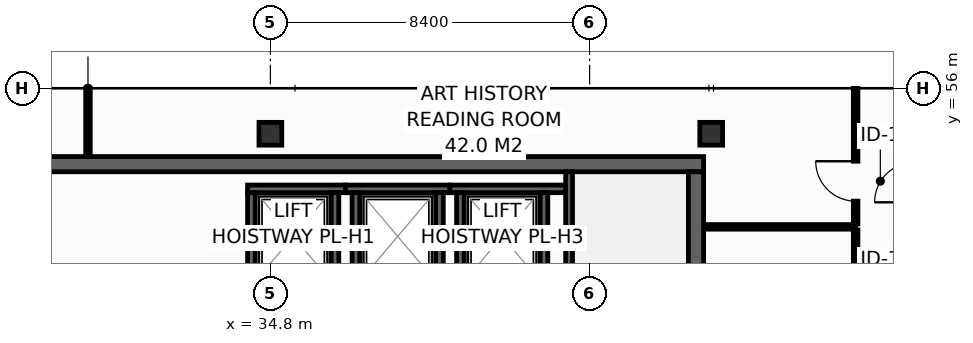
"""IFC4 building model, lengths in metres.
Left out: names, types, materials, properties, quantities, classifications, styles, units other than length and angle.
Written with IfcOpenShell. Run it as: python <this file> out.ifc"""

import sys

from ifc_helpers import new_model, si_unit, direction, frame, frame_2d, origin, origin_2d, place, context, subcontext, project, spatial, rectangle, hollow_rectangle, extrude, element, fill, save


model = new_model("IFC4")
c1 = context("Model", 3, precision=1e-05, world=origin(), true_north=direction((0.0, 1.0)))
c2 = subcontext(c1, "Body", "Model", "MODEL_VIEW")
j1 = project(units=[si_unit("LENGTHUNIT", "METRE"), si_unit("PLANEANGLEUNIT", "RADIAN")], contexts=[c1])
p1 = place(None, origin())
s1 = spatial("IfcSite", under=j1, at=p1, CompositionType="ELEMENT")
p2 = place(p1, origin())
s2 = spatial("IfcBuilding", under=s1, at=p2, CompositionType="ELEMENT")
p3 = place(p2, frame((0.0, 0.0, 280.0)))
s3 = spatial("IfcBuildingStorey", under=s2, at=p3, CompositionType="ELEMENT", Elevation=280.0)
p4 = place(p3, frame((13.7, 54.0, 0.0), z_axis=(0.0, 0.0, 1.0), x_axis=(1.0, 0.0, 0.0)))
e1 = element("IfcWall", 1, at=p4, inside=s3, PredefinedType="SHEAR", context=c2, shape_type="SweptSolid", body=[
    extrude(rectangle(XDim=32.5, YDim=0.4, at=frame_2d((16.25, 0.0))), origin(), (0.0, 0.0, 1.0), 3.55),
])
p5 = place(p3, frame((46.0, 43.4, 0.0), z_axis=(0.0, 0.0, 1.0), x_axis=(0.0, 1.0, 0.0)))
e2 = element("IfcWall", 2, at=p5, inside=s3, PredefinedType="SHEAR", context=c2, shape_type="SweptSolid", body=[
    extrude(rectangle(XDim=10.4, YDim=0.4, at=frame_2d((5.2, 0.0))), origin(), (0.0, 0.0, 1.0), 3.55),
])
for number, where, z_axis, x_axis in (
    (3, (34.8, 54.8, 0.0), (0.0, 0.0, 1.0), (1.0, 0.0, 0.0)),
    (4, (46.4, 54.8, 0.0), (0.0, 0.0, 1.0), (1.0, 0.0, 0.0)),
):
    element("IfcColumn", number, at=place(p3, frame(where, z_axis=z_axis, x_axis=x_axis)), inside=s3, PredefinedType="COLUMN", context=c2, shape_type="SweptSolid", body=[
        extrude(hollow_rectangle(XDim=0.6, YDim=0.6, WallThickness=0.028, at=origin_2d()), origin(), (0.0, 0.0, 1.0), 3.8),
    ])
p6 = place(p3, frame((34.2, 53.35, 0.0), z_axis=(0.0, 0.0, 1.0), x_axis=(1.0, 0.0, 0.0)))
e5 = element("IfcWall", 5, at=p6, inside=s3, PredefinedType="SHEAR", context=c2, shape_type="SweptSolid", body=[
    extrude(rectangle(XDim=2.575, YDim=0.2, at=frame_2d((1.288, 0.0))), origin(), (0.0, 0.0, 1.0), 3.55),
])
for number, where, z_axis, x_axis in (
    (6, (34.3, 50.95, 0.0), (0.0, 0.0, 1.0), (0.0, 1.0, 0.0)),
    (7, (36.5, 50.95, 0.0), (0.0, 0.0, 1.0), (0.0, 1.0, 0.0)),
):
    element("IfcWall", number, at=place(p3, frame(where, z_axis=z_axis, x_axis=x_axis)), inside=s3, PredefinedType="SHEAR", context=c2, shape_type="SweptSolid", body=[
        extrude(rectangle(XDim=2.3, YDim=0.2, at=frame_2d((1.15, 0.0))), origin(), (0.0, 0.0, 1.0), 3.55),
    ])
p7 = place(p3, frame((36.775, 53.35, 0.0), z_axis=(0.0, 0.0, 1.0), x_axis=(1.0, 0.0, 0.0)))
e8 = element("IfcWall", 8, at=p7, inside=s3, PredefinedType="SHEAR", context=c2, shape_type="SweptSolid", body=[
    extrude(rectangle(XDim=2.75, YDim=0.2, at=frame_2d((1.375, 0.0))), origin(), (0.0, 0.0, 1.0), 3.55),
])
for number, where, z_axis, x_axis in (
    (9, (37.05, 50.95, 0.0), (0.0, 0.0, 1.0), (0.0, 1.0, 0.0)),
    (10, (39.25, 50.95, 0.0), (0.0, 0.0, 1.0), (0.0, 1.0, 0.0)),
):
    element("IfcWall", number, at=place(p3, frame(where, z_axis=z_axis, x_axis=x_axis)), inside=s3, PredefinedType="SHEAR", context=c2, shape_type="SweptSolid", body=[
        extrude(rectangle(XDim=2.3, YDim=0.2, at=frame_2d((1.15, 0.0))), origin(), (0.0, 0.0, 1.0), 3.55),
    ])
p8 = place(p3, frame((39.525, 53.35, 0.0), z_axis=(0.0, 0.0, 1.0), x_axis=(1.0, 0.0, 0.0)))
e11 = element("IfcWall", 11, at=p8, inside=s3, PredefinedType="SHEAR", context=c2, shape_type="SweptSolid", body=[
    extrude(rectangle(XDim=3.045, YDim=0.2, at=frame_2d((1.522, 0.0))), origin(), (0.0, 0.0, 1.0), 3.55),
])
for number, where, z_axis, x_axis in (
    (12, (39.8, 50.95, 0.0), (0.0, 0.0, 1.0), (0.0, 1.0, 0.0)),
    (13, (42.0, 50.95, 0.0), (0.0, 0.0, 1.0), (0.0, 1.0, 0.0)),
):
    element("IfcWall", number, at=place(p3, frame(where, z_axis=z_axis, x_axis=x_axis)), inside=s3, PredefinedType="SHEAR", context=c2, shape_type="SweptSolid", body=[
        extrude(rectangle(XDim=2.3, YDim=0.2, at=frame_2d((1.15, 0.0))), origin(), (0.0, 0.0, 1.0), 3.55),
    ])
p9 = place(p3, frame((42.66, 53.8, 0.0), z_axis=(0.0, 0.0, 1.0), x_axis=(0.0, -1.0, 0.0)))
e14 = element("IfcWall", 14, at=p9, inside=s3, PredefinedType="SHEAR", context=c2, shape_type="SweptSolid", body=[
    extrude(rectangle(XDim=10.4, YDim=0.18, at=frame_2d((5.2, 0.0))), origin(), (0.0, 0.0, 1.0), 3.55),
])
p10 = place(p9, frame((8.99, 0.0, 0.0)))
e15 = element("IfcOpeningElement", 15, at=p10, cuts=e14, PredefinedType="OPENING", context=c2, shape_type="SweptSolid", body=[
    extrude(rectangle(XDim=1.1, YDim=2.15, at=frame_2d((0.55, 1.075))), frame((0.0, 0.1, 0.0), z_axis=(0.0, -1.0, 0.0), x_axis=(1.0, 0.0, 0.0)), (0.0, 0.0, 1.0), 0.2),
])
p11 = place(p3, frame((46.22, 52.35, 0.0), z_axis=(0.0, 0.0, 1.0), x_axis=(1.0, 0.0, 0.0)))
e16 = element("IfcWall", 16, at=p11, inside=s3, PredefinedType="PARTITIONING", context=c2, shape_type="SweptSolid", body=[
    extrude(rectangle(XDim=3.98, YDim=0.12, at=frame_2d((1.99, 0.0))), origin(), (0.0, 0.0, 1.0), 3.55),
])
p12 = place(p3, frame((30.0, 54.22, 0.0), z_axis=(0.0, 0.0, 1.0), x_axis=(0.0, 1.0, 0.0)))
e17 = element("IfcWall", 17, at=p12, inside=s3, PredefinedType="PARTITIONING", context=c2, shape_type="SweptSolid", body=[
    extrude(rectangle(XDim=1.775, YDim=0.12, at=frame_2d((0.888, 0.0))), origin(), (0.0, 0.0, 1.0), 2.935),
])
p13 = place(p3, frame((50.2, 48.29, 0.0), z_axis=(0.0, 0.0, 1.0), x_axis=(0.0, 1.0, 0.0)))
e18 = element("IfcWall", 18, at=p13, inside=s3, PredefinedType="PARTITIONING", context=c2, shape_type="SweptSolid", body=[
    extrude(rectangle(XDim=3.98, YDim=0.12, at=frame_2d((1.99, 0.0))), origin(), (0.0, 0.0, 1.0), 3.55),
])
p14 = place(p13, frame((1.465, 0.0, 0.0)))
e19 = element("IfcOpeningElement", 19, at=p14, cuts=e18, PredefinedType="OPENING", context=c2, shape_type="SweptSolid", body=[
    extrude(rectangle(XDim=1.05, YDim=2.15, at=frame_2d((0.525, 1.075))), frame((0.0, 0.07, 0.0), z_axis=(0.0, -1.0, 0.0), x_axis=(1.0, 0.0, 0.0)), (0.0, 0.0, 1.0), 0.14),
])
p15 = place(p3, frame((50.2, 52.43, 0.0), z_axis=(0.0, 0.0, 1.0), x_axis=(0.0, 1.0, 0.0)))
e20 = element("IfcWall", 20, at=p15, inside=s3, PredefinedType="PARTITIONING", context=c2, shape_type="SweptSolid", body=[
    extrude(rectangle(XDim=3.565, YDim=0.12, at=frame_2d((1.783, 0.0))), origin(), (0.0, 0.0, 1.0), 2.935),
])
p16 = place(p15, frame((0.597, 0.0, 0.0)))
e21 = element("IfcOpeningElement", 21, at=p16, cuts=e20, PredefinedType="OPENING", context=c2, shape_type="SweptSolid", body=[
    extrude(rectangle(XDim=1.05, YDim=2.15, at=frame_2d((0.525, 1.075))), frame((0.0, 0.07, 0.0), z_axis=(0.0, -1.0, 0.0), x_axis=(1.0, 0.0, 0.0)), (0.0, 0.0, 1.0), 0.14),
])
p17 = place(p16, origin())
e22 = element("IfcDoor", 22, at=p17, inside=s3, OperationType="SINGLE_SWING_RIGHT", PredefinedType="DOOR", context=c2, shape_type="SweptSolid", body=[
    extrude(rectangle(XDim=1.05, YDim=2.15, at=frame_2d((0.525, 1.075))), frame((0.0, 0.025, 0.0), z_axis=(0.0, -1.0, 0.0), x_axis=(1.0, 0.0, 0.0)), (0.0, 0.0, 1.0), 0.05),
])
fill(e21, e22)
save(model, sys.argv[1])
